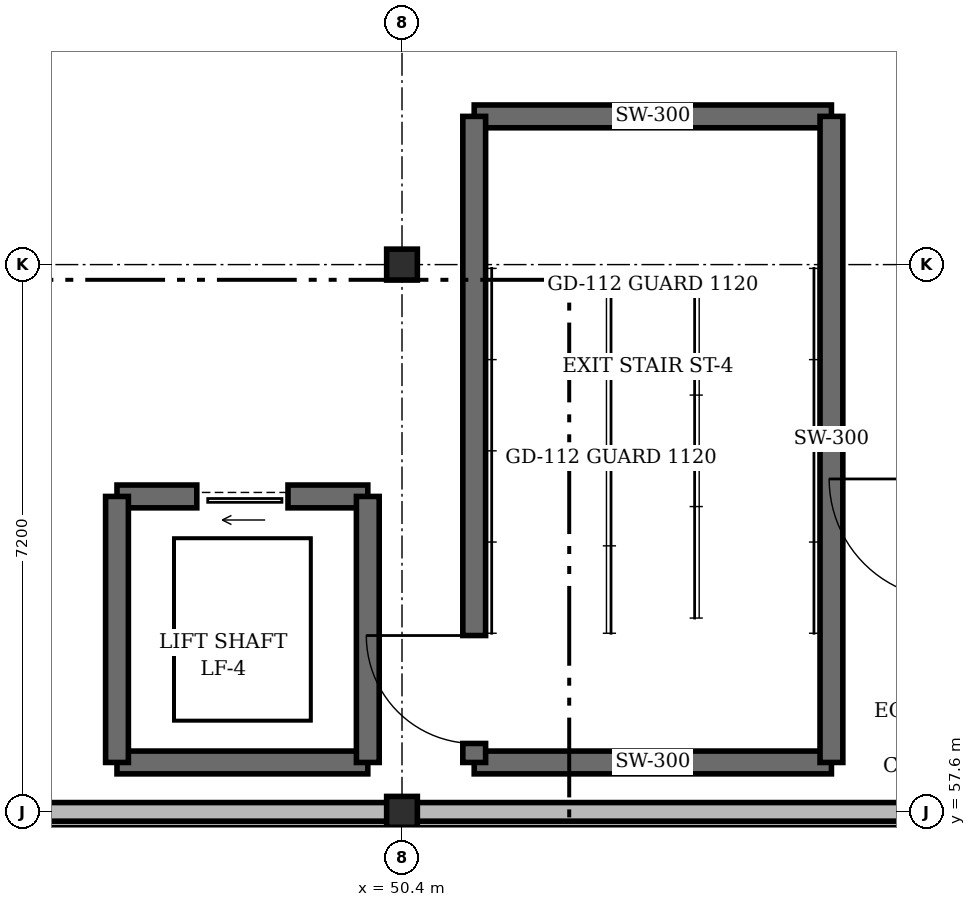
"""IFC4 building model, lengths in metres.
Left out: names, types, materials, properties, quantities, classifications, styles, units other than length and angle.
Written with IfcOpenShell. Run it as: python <this file> out.ifc"""

import sys

from ifc_helpers import new_model, si_unit, direction, frame, frame_2d, origin, origin_2d, place, context, subcontext, project, spatial, rectangle, i_section, extrude, element, fill, save


model = new_model("IFC4")
c1 = context("Model", 3, precision=1e-05, world=origin(), true_north=direction((0.0, 1.0)))
c2 = subcontext(c1, "Body", "Model", "MODEL_VIEW")
j1 = project(units=[si_unit("LENGTHUNIT", "METRE"), si_unit("PLANEANGLEUNIT", "RADIAN")], contexts=[c1])
p1 = place(None, origin())
s1 = spatial("IfcSite", under=j1, at=p1, CompositionType="ELEMENT")
p2 = place(p1, origin())
s2 = spatial("IfcBuilding", under=s1, at=p2, CompositionType="ELEMENT")
p3 = place(p2, origin())
s3 = spatial("IfcBuildingStorey", under=s2, at=p3, CompositionType="ELEMENT", Elevation=0.0)
for number, where, z_axis, x_axis in (
    (1, (50.4, 57.6, 0.0), (0.0, 0.0, 1.0), (1.0, 0.0, 0.0)),
    (2, (50.4, 64.8, 0.0), (0.0, 0.0, 1.0), (1.0, 0.0, 0.0)),
):
    element("IfcColumn", number, at=place(p3, frame(where, z_axis=z_axis, x_axis=x_axis)), inside=s3, PredefinedType="COLUMN", context=c2, shape_type="SweptSolid", body=[
        extrude(i_section(OverallWidth=0.404, OverallDepth=0.407, WebThickness=0.027, FlangeThickness=0.044, at=origin_2d()), origin(), (0.0, 0.0, 1.0), 6.0),
    ])
for number, where, z_axis, x_axis in (
    (3, (51.35, 58.25, 0.0), (0.0, 0.0, 1.0), (1.0, 0.0, 0.0)),
    (4, (56.05, 66.75, 0.0), (0.0, 0.0, 1.0), (-1.0, 0.0, 0.0)),
):
    element("IfcWall", number, at=place(p3, frame(where, z_axis=z_axis, x_axis=x_axis)), inside=s3, PredefinedType="SHEAR", context=c2, shape_type="SweptSolid", body=[
        extrude(rectangle(XDim=4.7, YDim=0.3, at=frame_2d((2.35, 0.0))), origin(), (0.0, 0.0, 1.0), 5.715),
    ])
p4 = place(p3, frame((51.35, 58.25, 0.0), z_axis=(0.0, 0.0, 1.0), x_axis=(0.0, 1.0, 0.0)))
e5 = element("IfcWall", 5, at=p4, inside=s3, PredefinedType="SHEAR", context=c2, shape_type="SweptSolid", body=[
    extrude(rectangle(XDim=8.5, YDim=0.3, at=frame_2d((4.25, 0.0))), origin(), (0.0, 0.0, 1.0), 5.715),
])
p5 = place(p4, frame((0.25, 0.0, 0.0)))
e6 = element("IfcOpeningElement", 6, at=p5, cuts=e5, PredefinedType="OPENING", context=c2, shape_type="SweptSolid", body=[
    extrude(rectangle(XDim=1.42, YDim=2.22, at=frame_2d((0.71, 1.11))), frame((0.0, 0.16, 0.0), z_axis=(0.0, -1.0, 0.0), x_axis=(1.0, 0.0, 0.0)), (0.0, 0.0, 1.0), 0.32),
])
p6 = place(p3, frame((56.05, 66.75, 0.0), z_axis=(0.0, 0.0, 1.0), x_axis=(0.0, -1.0, 0.0)))
e7 = element("IfcWall", 7, at=p6, inside=s3, PredefinedType="SHEAR", context=c2, shape_type="SweptSolid", body=[
    extrude(rectangle(XDim=8.5, YDim=0.3, at=frame_2d((4.25, 0.0))), origin(), (0.0, 0.0, 1.0), 5.715),
])
p7 = place(p3, frame((46.65, 58.25, 0.0), z_axis=(0.0, 0.0, 1.0), x_axis=(1.0, 0.0, 0.0)))
e8 = element("IfcWall", 8, at=p7, inside=s3, PredefinedType="SHEAR", context=c2, shape_type="SweptSolid", body=[
    extrude(rectangle(XDim=3.3, YDim=0.3, at=frame_2d((1.65, 0.0))), origin(), (0.0, 0.0, 1.0), 5.715),
])
p8 = place(p3, frame((49.95, 61.75, 0.0), z_axis=(0.0, 0.0, 1.0), x_axis=(-1.0, 0.0, 0.0)))
e9 = element("IfcWall", 9, at=p8, inside=s3, PredefinedType="SHEAR", context=c2, shape_type="SweptSolid", body=[
    extrude(rectangle(XDim=3.3, YDim=0.3, at=frame_2d((1.65, 0.0))), origin(), (0.0, 0.0, 1.0), 5.715),
])
p9 = place(p8, frame((1.05, 0.0, 0.0)))
e10 = element("IfcOpeningElement", 10, at=p9, cuts=e9, PredefinedType="OPENING", context=c2, shape_type="SweptSolid", body=[
    extrude(rectangle(XDim=1.2, YDim=2.26, at=frame_2d((0.6, 1.13))), frame((0.0, 0.16, 0.0), z_axis=(0.0, -1.0, 0.0), x_axis=(1.0, 0.0, 0.0)), (0.0, 0.0, 1.0), 0.32),
])
for number, where, z_axis, x_axis in (
    (11, (46.65, 61.75, 0.0), (0.0, 0.0, 1.0), (0.0, -1.0, 0.0)),
    (12, (49.95, 58.25, 0.0), (0.0, 0.0, 1.0), (0.0, 1.0, 0.0)),
):
    element("IfcWall", number, at=place(p3, frame(where, z_axis=z_axis, x_axis=x_axis)), inside=s3, PredefinedType="SHEAR", context=c2, shape_type="SweptSolid", body=[
        extrude(rectangle(XDim=3.5, YDim=0.3, at=frame_2d((1.75, 0.0))), origin(), (0.0, 0.0, 1.0), 5.715),
    ])
p10 = place(p3, frame((28.8, 57.6, 0.0), z_axis=(0.0, 0.0, 1.0), x_axis=(1.0, 0.0, 0.0)))
e13 = element("IfcWall", 13, at=p10, inside=s3, PredefinedType="STANDARD", context=c2, shape_type="SweptSolid", body=[
    extrude(rectangle(XDim=28.8, YDim=0.245, at=frame_2d((14.4, 0.0))), origin(), (0.0, 0.0, 1.0), 5.022),
])
p11 = place(p10, frame((11.37, 0.0, 0.0)))
e14 = element("IfcOpeningElement", 14, at=p11, cuts=e13, PredefinedType="OPENING", context=c2, shape_type="SweptSolid", body=[
    extrude(rectangle(XDim=1.46, YDim=2.26, at=frame_2d((0.73, 1.13))), frame((0.0, 0.133, 0.0), z_axis=(0.0, -1.0, 0.0), x_axis=(1.0, 0.0, 0.0)), (0.0, 0.0, 1.0), 0.265),
])
p12 = place(p5, origin())
e15 = element("IfcDoor", 15, at=p12, inside=s3, OperationType="SINGLE_SWING_RIGHT", PredefinedType="DOOR", context=c2, shape_type="SweptSolid", body=[
    extrude(rectangle(XDim=1.42, YDim=2.22, at=frame_2d((0.71, 1.11))), frame((0.0, 0.025, 0.0), z_axis=(0.0, -1.0, 0.0), x_axis=(1.0, 0.0, 0.0)), (0.0, 0.0, 1.0), 0.05),
])
fill(e6, e15)
p13 = place(p9, origin())
e16 = element("IfcDoor", 16, at=p13, inside=s3, OperationType="SLIDING_TO_LEFT", PredefinedType="DOOR", context=c2, shape_type="SweptSolid", body=[
    extrude(rectangle(XDim=1.2, YDim=2.26, at=frame_2d((0.6, 1.13))), frame((0.0, 0.025, 0.0), z_axis=(0.0, -1.0, 0.0), x_axis=(1.0, 0.0, 0.0)), (0.0, 0.0, 1.0), 0.05),
])
fill(e10, e16)
save(model, sys.argv[1])
